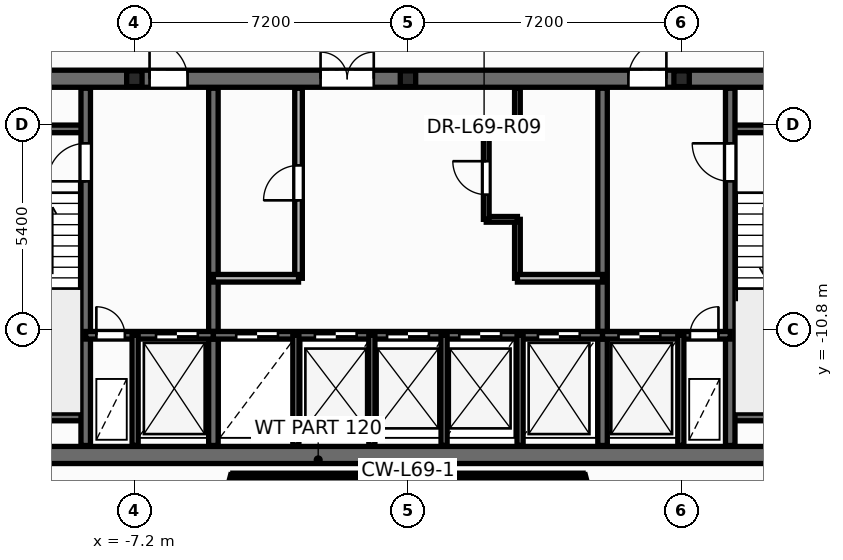
"""IFC4 building model, lengths in metres.
Left out: names, types, materials, properties, quantities, classifications, styles, units other than length and angle.
Written with IfcOpenShell. Run it as: python <this file> out.ifc"""

import sys

from ifc_helpers import new_model, si_unit, direction, frame, frame_2d, origin, origin_2d, place, context, subcontext, project, spatial, rectangle, i_section, extrude, element, fill, save


model = new_model("IFC4")
c1 = context("Model", 3, precision=1e-05, world=origin(), true_north=direction((0.0, 1.0)))
c2 = subcontext(c1, "Body", "Model", "MODEL_VIEW")
j1 = project(units=[si_unit("LENGTHUNIT", "METRE"), si_unit("PLANEANGLEUNIT", "RADIAN")], contexts=[c1])
p1 = place(None, origin())
s1 = spatial("IfcSite", under=j1, at=p1, CompositionType="ELEMENT")
p2 = place(p1, origin())
s2 = spatial("IfcBuilding", under=s1, at=p2, CompositionType="ELEMENT")
p3 = place(p2, frame((0.0, 0.0, 263.4)))
s3 = spatial("IfcBuildingStorey", under=s2, at=p3, CompositionType="ELEMENT", Elevation=263.4)
for number, where, z_axis, x_axis in (
    (1, (-7.2, -4.2, 0.0), (0.0, 0.0, 1.0), (1.0, 0.0, 0.0)),
    (2, (0.0, -4.2, 0.0), (0.0, 0.0, 1.0), (1.0, 0.0, 0.0)),
    (3, (7.2, -4.2, 0.0), (0.0, 0.0, 1.0), (1.0, 0.0, 0.0)),
):
    element("IfcColumn", number, at=place(p3, frame(where, z_axis=z_axis, x_axis=x_axis)), inside=s3, PredefinedType="PILASTER", context=c2, shape_type="SweptSolid", body=[
        extrude(i_section(OverallWidth=0.405, OverallDepth=0.414, WebThickness=0.022, FlangeThickness=0.032, at=origin_2d()), origin(), (0.0, 0.0, 1.0), 3.6),
    ])
p4 = place(p3, frame((2.88, -9.45, 0.0), z_axis=(0.0, 0.0, 1.0), x_axis=(0.0, 1.0, 0.0)))
e4 = element("IfcWall", 4, at=p4, inside=s3, PredefinedType="PARTITIONING", context=c2, shape_type="SweptSolid", body=[
    extrude(rectangle(XDim=1.55, YDim=0.15, at=frame_2d((0.775, 0.0))), origin(), (0.0, 0.0, 1.0), 3.345),
])
p5 = place(p3, frame((2.06, -7.9, 0.0), z_axis=(0.0, 0.0, 1.0), x_axis=(1.0, 0.0, 0.0)))
e5 = element("IfcWall", 5, at=p5, inside=s3, PredefinedType="PARTITIONING", context=c2, shape_type="SweptSolid", body=[
    extrude(rectangle(XDim=0.82, YDim=0.15, at=frame_2d((0.41, 0.0))), origin(), (0.0, 0.0, 1.0), 3.345),
])
p6 = place(p3, frame((2.06, -7.9, 0.0), z_axis=(0.0, 0.0, 1.0), x_axis=(0.0, 1.0, 0.0)))
e6 = element("IfcWall", 6, at=p6, inside=s3, PredefinedType="PARTITIONING", context=c2, shape_type="SweptSolid", body=[
    extrude(rectangle(XDim=2.3, YDim=0.15, at=frame_2d((1.15, 0.0))), origin(), (0.0, 0.0, 1.0), 3.345),
])
p7 = place(p6, frame((0.65, 0.0, 0.0)))
e7 = element("IfcOpeningElement", 7, at=p7, cuts=e6, PredefinedType="OPENING", context=c2, shape_type="SweptSolid", body=[
    extrude(rectangle(XDim=0.886, YDim=2.104, at=frame_2d((0.44, 1.052))), frame((0.0, 0.085, 0.0), z_axis=(0.0, -1.0, 0.0), x_axis=(1.0, 0.0, 0.0)), (0.0, 0.0, 1.0), 0.17),
])
p8 = place(p3, frame((2.06, -5.6, 0.0), z_axis=(0.0, 0.0, 1.0), x_axis=(1.0, 0.0, 0.0)))
e8 = element("IfcWall", 8, at=p8, inside=s3, PredefinedType="PARTITIONING", context=c2, shape_type="SweptSolid", body=[
    extrude(rectangle(XDim=0.82, YDim=0.15, at=frame_2d((0.41, 0.0))), origin(), (0.0, 0.0, 1.0), 3.345),
])
p9 = place(p3, frame((2.88, -5.6, 0.0), z_axis=(0.0, 0.0, 1.0), x_axis=(0.0, 1.0, 0.0)))
e9 = element("IfcWall", 9, at=p9, inside=s3, PredefinedType="PARTITIONING", context=c2, shape_type="SweptSolid", body=[
    extrude(rectangle(XDim=1.15, YDim=0.15, at=frame_2d((0.575, 0.0))), origin(), (0.0, 0.0, 1.0), 3.345),
])
p10 = place(p3, frame((-12.65, -14.1, 0.0), z_axis=(0.0, 0.0, 1.0), x_axis=(1.0, 0.0, 0.0)))
e10 = element("IfcWall", 10, at=p10, inside=s3, PredefinedType="SHEAR", context=c2, shape_type="SweptSolid", body=[
    extrude(rectangle(XDim=25.3, YDim=0.45, at=frame_2d((12.65, 0.0))), origin(), (0.0, 0.0, 1.0), 3.6),
])
p11 = place(p3, frame((-12.65, -4.2, 0.0), z_axis=(0.0, 0.0, 1.0), x_axis=(1.0, 0.0, 0.0)))
e11 = element("IfcWall", 11, at=p11, inside=s3, PredefinedType="SHEAR", context=c2, shape_type="SweptSolid", body=[
    extrude(rectangle(XDim=25.3, YDim=0.45, at=frame_2d((12.65, 0.0))), origin(), (0.0, 0.0, 1.0), 3.6),
])
p12 = place(p11, frame((1.85, 0.0, 0.0)))
e12 = element("IfcOpeningElement", 12, at=p12, cuts=e11, PredefinedType="OPENING", context=c2, shape_type="SweptSolid", body=[
    extrude(rectangle(XDim=0.756, YDim=2.054, at=frame_2d((0.375, 1.027))), frame((0.0, 0.235, 0.0), z_axis=(0.0, -1.0, 0.0), x_axis=(1.0, 0.0, 0.0)), (0.0, 0.0, 1.0), 0.47),
])
p13 = place(p11, frame((22.65, 0.0, 0.0)))
e13 = element("IfcOpeningElement", 13, at=p13, cuts=e11, PredefinedType="OPENING", context=c2, shape_type="SweptSolid", body=[
    extrude(rectangle(XDim=0.756, YDim=2.054, at=frame_2d((0.375, 1.027))), frame((0.0, 0.235, 0.0), z_axis=(0.0, -1.0, 0.0), x_axis=(1.0, 0.0, 0.0)), (0.0, 0.0, 1.0), 0.47),
])
p14 = place(p11, frame((5.85, 0.0, 0.0)))
e14 = element("IfcOpeningElement", 14, at=p14, cuts=e11, PredefinedType="OPENING", context=c2, shape_type="SweptSolid", body=[
    extrude(rectangle(XDim=1.006, YDim=2.104, at=frame_2d((0.5, 1.052))), frame((0.0, 0.235, 0.0), z_axis=(0.0, -1.0, 0.0), x_axis=(1.0, 0.0, 0.0)), (0.0, 0.0, 1.0), 0.47),
])
p15 = place(p11, frame((10.35, 0.0, 0.0)))
e15 = element("IfcOpeningElement", 15, at=p15, cuts=e11, PredefinedType="OPENING", context=c2, shape_type="SweptSolid", body=[
    extrude(rectangle(XDim=1.406, YDim=2.154, at=frame_2d((0.7, 1.077))), frame((0.0, 0.235, 0.0), z_axis=(0.0, -1.0, 0.0), x_axis=(1.0, 0.0, 0.0)), (0.0, 0.0, 1.0), 0.47),
])
p16 = place(p11, frame((18.45, 0.0, 0.0)))
e16 = element("IfcOpeningElement", 16, at=p16, cuts=e11, PredefinedType="OPENING", context=c2, shape_type="SweptSolid", body=[
    extrude(rectangle(XDim=1.006, YDim=2.104, at=frame_2d((0.5, 1.052))), frame((0.0, 0.235, 0.0), z_axis=(0.0, -1.0, 0.0), x_axis=(1.0, 0.0, 0.0)), (0.0, 0.0, 1.0), 0.47),
])
for number, where, z_axis, x_axis in (
    (17, (-12.35, -5.52, 0.0), (0.0, 0.0, 1.0), (1.0, 0.0, 0.0)),
    (18, (-12.35, -13.1, 0.0), (0.0, 0.0, 1.0), (1.0, 0.0, 0.0)),
    (19, (8.48, -5.52, 0.0), (0.0, 0.0, 1.0), (1.0, 0.0, 0.0)),
    (20, (8.48, -13.1, 0.0), (0.0, 0.0, 1.0), (1.0, 0.0, 0.0)),
):
    element("IfcWall", number, at=place(p3, frame(where, z_axis=z_axis, x_axis=x_axis)), inside=s3, PredefinedType="SOLIDWALL", context=c2, shape_type="SweptSolid", body=[
        extrude(rectangle(XDim=3.87, YDim=0.2, at=frame_2d((1.935, 0.0))), origin(), (0.0, 0.0, 1.0), 3.6),
    ])
p17 = place(p3, frame((-8.48, -13.85, 0.0), z_axis=(0.0, 0.0, 1.0), x_axis=(0.0, 1.0, 0.0)))
e21 = element("IfcWall", 21, at=p17, inside=s3, PredefinedType="SHEAR", context=c2, shape_type="SweptSolid", body=[
    extrude(rectangle(XDim=9.4, YDim=0.25, at=frame_2d((4.7, 0.0))), origin(), (0.0, 0.0, 1.0), 3.6),
])
p18 = place(p17, frame((6.95, 0.0, 0.0)))
e22 = element("IfcOpeningElement", 22, at=p18, cuts=e21, PredefinedType="OPENING", context=c2, shape_type="SweptSolid", body=[
    extrude(rectangle(XDim=1.006, YDim=2.104, at=frame_2d((0.5, 1.052))), frame((0.0, 0.135, 0.0), z_axis=(0.0, -1.0, 0.0), x_axis=(1.0, 0.0, 0.0)), (0.0, 0.0, 1.0), 0.27),
])
p19 = place(p3, frame((8.48, -13.85, 0.0), z_axis=(0.0, 0.0, 1.0), x_axis=(0.0, 1.0, 0.0)))
e23 = element("IfcWall", 23, at=p19, inside=s3, PredefinedType="SHEAR", context=c2, shape_type="SweptSolid", body=[
    extrude(rectangle(XDim=9.4, YDim=0.25, at=frame_2d((4.7, 0.0))), origin(), (0.0, 0.0, 1.0), 3.6),
])
p20 = place(p19, frame((6.95, 0.0, 0.0)))
e24 = element("IfcOpeningElement", 24, at=p20, cuts=e23, PredefinedType="OPENING", context=c2, shape_type="SweptSolid", body=[
    extrude(rectangle(XDim=1.006, YDim=2.104, at=frame_2d((0.5, 1.052))), frame((0.0, 0.135, 0.0), z_axis=(0.0, -1.0, 0.0), x_axis=(1.0, 0.0, 0.0)), (0.0, 0.0, 1.0), 0.27),
])
for number, where, z_axis, x_axis in (
    (25, (-5.12, -13.85, 0.0), (0.0, 0.0, 1.0), (0.0, 1.0, 0.0)),
    (26, (5.12, -13.85, 0.0), (0.0, 0.0, 1.0), (0.0, 1.0, 0.0)),
):
    element("IfcWall", number, at=place(p3, frame(where, z_axis=z_axis, x_axis=x_axis)), inside=s3, PredefinedType="SHEAR", context=c2, shape_type="SweptSolid", body=[
        extrude(rectangle(XDim=9.4, YDim=0.25, at=frame_2d((4.7, 0.0))), origin(), (0.0, 0.0, 1.0), 3.6),
    ])
p21 = place(p3, frame((-8.48, -10.95, 0.0), z_axis=(0.0, 0.0, 1.0), x_axis=(1.0, 0.0, 0.0)))
e27 = element("IfcWall", 27, at=p21, inside=s3, PredefinedType="SOLIDWALL", context=c2, shape_type="SweptSolid", body=[
    extrude(rectangle(XDim=3.36, YDim=0.2, at=frame_2d((1.68, 0.0))), origin(), (0.0, 0.0, 1.0), 3.6),
])
p22 = place(p21, frame((0.28, 0.0, 0.0)))
e28 = element("IfcOpeningElement", 28, at=p22, cuts=e27, PredefinedType="OPENING", context=c2, shape_type="SweptSolid", body=[
    extrude(rectangle(XDim=0.756, YDim=2.054, at=frame_2d((0.375, 1.027))), frame((0.0, 0.11, 0.0), z_axis=(0.0, -1.0, 0.0), x_axis=(1.0, 0.0, 0.0)), (0.0, 0.0, 1.0), 0.22),
])
p23 = place(p21, frame((1.85, 0.0, 0.0)))
e29 = element("IfcOpeningElement", 29, at=p23, cuts=e27, PredefinedType="OPENING", context=c2, shape_type="SweptSolid", body=[
    extrude(rectangle(XDim=1.106, YDim=2.104, at=frame_2d((0.55, 1.052))), frame((0.0, 0.11, 0.0), z_axis=(0.0, -1.0, 0.0), x_axis=(1.0, 0.0, 0.0)), (0.0, 0.0, 1.0), 0.22),
])
p24 = place(p3, frame((-5.12, -10.95, 0.0), z_axis=(0.0, 0.0, 1.0), x_axis=(1.0, 0.0, 0.0)))
e30 = element("IfcWall", 30, at=p24, inside=s3, PredefinedType="SOLIDWALL", context=c2, shape_type="SweptSolid", body=[
    extrude(rectangle(XDim=10.24, YDim=0.2, at=frame_2d((5.12, 0.0))), origin(), (0.0, 0.0, 1.0), 3.6),
])
p25 = place(p24, frame((0.6, 0.0, 0.0)))
e31 = element("IfcOpeningElement", 31, at=p25, cuts=e30, PredefinedType="OPENING", context=c2, shape_type="SweptSolid", body=[
    extrude(rectangle(XDim=1.106, YDim=2.104, at=frame_2d((0.55, 1.052))), frame((0.0, 0.11, 0.0), z_axis=(0.0, -1.0, 0.0), x_axis=(1.0, 0.0, 0.0)), (0.0, 0.0, 1.0), 0.22),
])
p26 = place(p24, frame((2.67, 0.0, 0.0)))
e32 = element("IfcOpeningElement", 32, at=p26, cuts=e30, PredefinedType="OPENING", context=c2, shape_type="SweptSolid", body=[
    extrude(rectangle(XDim=1.106, YDim=2.104, at=frame_2d((0.55, 1.052))), frame((0.0, 0.11, 0.0), z_axis=(0.0, -1.0, 0.0), x_axis=(1.0, 0.0, 0.0)), (0.0, 0.0, 1.0), 0.22),
])
p27 = place(p24, frame((4.57, 0.0, 0.0)))
e33 = element("IfcOpeningElement", 33, at=p27, cuts=e30, PredefinedType="OPENING", context=c2, shape_type="SweptSolid", body=[
    extrude(rectangle(XDim=1.106, YDim=2.104, at=frame_2d((0.55, 1.052))), frame((0.0, 0.11, 0.0), z_axis=(0.0, -1.0, 0.0), x_axis=(1.0, 0.0, 0.0)), (0.0, 0.0, 1.0), 0.22),
])
p28 = place(p24, frame((6.47, 0.0, 0.0)))
e34 = element("IfcOpeningElement", 34, at=p28, cuts=e30, PredefinedType="OPENING", context=c2, shape_type="SweptSolid", body=[
    extrude(rectangle(XDim=1.106, YDim=2.104, at=frame_2d((0.55, 1.052))), frame((0.0, 0.11, 0.0), z_axis=(0.0, -1.0, 0.0), x_axis=(1.0, 0.0, 0.0)), (0.0, 0.0, 1.0), 0.22),
])
p29 = place(p24, frame((8.54, 0.0, 0.0)))
e35 = element("IfcOpeningElement", 35, at=p29, cuts=e30, PredefinedType="OPENING", context=c2, shape_type="SweptSolid", body=[
    extrude(rectangle(XDim=1.106, YDim=2.104, at=frame_2d((0.55, 1.052))), frame((0.0, 0.11, 0.0), z_axis=(0.0, -1.0, 0.0), x_axis=(1.0, 0.0, 0.0)), (0.0, 0.0, 1.0), 0.22),
])
p30 = place(p3, frame((5.12, -10.95, 0.0), z_axis=(0.0, 0.0, 1.0), x_axis=(1.0, 0.0, 0.0)))
e36 = element("IfcWall", 36, at=p30, inside=s3, PredefinedType="SOLIDWALL", context=c2, shape_type="SweptSolid", body=[
    extrude(rectangle(XDim=3.36, YDim=0.2, at=frame_2d((1.68, 0.0))), origin(), (0.0, 0.0, 1.0), 3.6),
])
p31 = place(p30, frame((0.42, 0.0, 0.0)))
e37 = element("IfcOpeningElement", 37, at=p31, cuts=e36, PredefinedType="OPENING", context=c2, shape_type="SweptSolid", body=[
    extrude(rectangle(XDim=1.106, YDim=2.104, at=frame_2d((0.55, 1.052))), frame((0.0, 0.11, 0.0), z_axis=(0.0, -1.0, 0.0), x_axis=(1.0, 0.0, 0.0)), (0.0, 0.0, 1.0), 0.22),
])
p32 = place(p30, frame((2.3, 0.0, 0.0)))
e38 = element("IfcOpeningElement", 38, at=p32, cuts=e36, PredefinedType="OPENING", context=c2, shape_type="SweptSolid", body=[
    extrude(rectangle(XDim=0.756, YDim=2.054, at=frame_2d((0.375, 1.027))), frame((0.0, 0.11, 0.0), z_axis=(0.0, -1.0, 0.0), x_axis=(1.0, 0.0, 0.0)), (0.0, 0.0, 1.0), 0.22),
])
for number, where, z_axis, x_axis in (
    (39, (-7.18, -13.85, 0.0), (0.0, 0.0, 1.0), (0.0, 1.0, 0.0)),
    (40, (7.18, -13.85, 0.0), (0.0, 0.0, 1.0), (0.0, 1.0, 0.0)),
    (41, (-2.95, -13.85, 0.0), (0.0, 0.0, 1.0), (0.0, 1.0, 0.0)),
    (42, (2.95, -13.85, 0.0), (0.0, 0.0, 1.0), (0.0, 1.0, 0.0)),
):
    element("IfcWall", number, at=place(p3, frame(where, z_axis=z_axis, x_axis=x_axis)), inside=s3, PredefinedType="PARTITIONING", context=c2, shape_type="SweptSolid", body=[
        extrude(rectangle(XDim=2.9, YDim=0.16, at=frame_2d((1.45, 0.0))), origin(), (0.0, 0.0, 1.0), 2.57),
    ])
p33 = place(p3, frame((-2.88, -9.45, 0.0), z_axis=(0.0, 0.0, 1.0), x_axis=(0.0, 1.0, 0.0)))
e43 = element("IfcWall", 43, at=p33, inside=s3, PredefinedType="SOLIDWALL", context=c2, shape_type="SweptSolid", body=[
    extrude(rectangle(XDim=5.0, YDim=0.2, at=frame_2d((2.5, 0.0))), origin(), (0.0, 0.0, 1.0), 3.345),
])
p34 = place(p33, frame((2.05, 0.0, 0.0)))
e44 = element("IfcOpeningElement", 44, at=p34, cuts=e43, PredefinedType="OPENING", context=c2, shape_type="SweptSolid", body=[
    extrude(rectangle(XDim=0.926, YDim=2.104, at=frame_2d((0.46, 1.052))), frame((0.0, 0.11, 0.0), z_axis=(0.0, -1.0, 0.0), x_axis=(1.0, 0.0, 0.0)), (0.0, 0.0, 1.0), 0.22),
])
for number, where, z_axis, x_axis in (
    (45, (-5.12, -9.45, 0.0), (0.0, 0.0, 1.0), (1.0, 0.0, 0.0)),
    (46, (2.88, -9.45, 0.0), (0.0, 0.0, 1.0), (1.0, 0.0, 0.0)),
):
    element("IfcWall", number, at=place(p3, frame(where, z_axis=z_axis, x_axis=x_axis)), inside=s3, PredefinedType="SOLIDWALL", context=c2, shape_type="SweptSolid", body=[
        extrude(rectangle(XDim=2.24, YDim=0.2, at=frame_2d((1.12, 0.0))), origin(), (0.0, 0.0, 1.0), 3.345),
    ])
for number, where, z_axis, x_axis in (
    (47, (-0.95, -13.85, 0.0), (0.0, 0.0, 1.0), (0.0, 1.0, 0.0)),
    (48, (0.95, -13.85, 0.0), (0.0, 0.0, 1.0), (0.0, 1.0, 0.0)),
):
    element("IfcWall", number, at=place(p3, frame(where, z_axis=z_axis, x_axis=x_axis)), inside=s3, PredefinedType="PARTITIONING", context=c2, shape_type="SweptSolid", body=[
        extrude(rectangle(XDim=2.9, YDim=0.16, at=frame_2d((1.45, 0.0))), origin(), (0.0, 0.0, 1.0), 2.57),
    ])
for number, where, z_axis, x_axis in (
    (49, (-4.609, -14.639, 0.0), (0.0, 0.0, 1.0), (1.0, 0.0, 0.0)),
    (50, (0.116, -14.639, 0.0), (0.0, 0.0, 1.0), (1.0, 0.0, 0.0)),
):
    element("IfcWall", number, at=place(p3, frame(where, z_axis=z_axis, x_axis=x_axis)), inside=s3, PredefinedType="PARTITIONING", context=c2, shape_type="SweptSolid", body=[
        extrude(rectangle(XDim=4.493, YDim=0.12, at=frame_2d((2.247, 0.0))), origin(), (0.0, 0.0, 1.0), 3.345),
    ])
for number, where, z_axis, x_axis in (
    (51, (-4.783, -15.309, 0.0), (0.0, 0.0, 1.0), (0.252, 0.968, 0.0)),
    (52, (4.609, -14.639, 0.0), (0.0, 0.0, 1.0), (0.252, -0.968, 0.0)),
):
    element("IfcWall", number, at=place(p3, frame(where, z_axis=z_axis, x_axis=x_axis)), inside=s3, PredefinedType="PARTITIONING", context=c2, shape_type="SweptSolid", body=[
        extrude(rectangle(XDim=0.692, YDim=0.12, at=frame_2d((0.346, 0.0))), origin(), (0.0, 0.0, 1.0), 2.863),
    ])
for number, where, z_axis, x_axis in (
    (53, (-0.116, -14.639, 0.0), (0.0, 0.0, 1.0), (0.0, -1.0, 0.0)),
    (54, (0.116, -15.309, 0.0), (0.0, 0.0, 1.0), (0.0, 1.0, 0.0)),
):
    element("IfcWall", number, at=place(p3, frame(where, z_axis=z_axis, x_axis=x_axis)), inside=s3, PredefinedType="PARTITIONING", context=c2, shape_type="SweptSolid", body=[
        extrude(rectangle(XDim=0.67, YDim=0.12, at=frame_2d((0.335, 0.0))), origin(), (0.0, 0.0, 1.0), 2.863),
    ])
p35 = place(p34, origin())
e55 = element("IfcDoor", 55, at=p35, inside=s3, OperationType="SINGLE_SWING_LEFT", PredefinedType="DOOR", context=c2, shape_type="SweptSolid", body=[
    extrude(rectangle(XDim=0.92, YDim=2.1, at=frame_2d((0.46, 1.05))), frame((0.0, 0.025, 0.0), z_axis=(0.0, -1.0, 0.0), x_axis=(1.0, 0.0, 0.0)), (0.0, 0.0, 1.0), 0.05),
])
fill(e44, e55)
p36 = place(p7, origin())
e56 = element("IfcDoor", 56, at=p36, inside=s3, OperationType="SINGLE_SWING_RIGHT", PredefinedType="DOOR", context=c2, shape_type="SweptSolid", body=[
    extrude(rectangle(XDim=0.88, YDim=2.1, at=frame_2d((0.44, 1.05))), frame((0.0, 0.025, 0.0), z_axis=(0.0, -1.0, 0.0), x_axis=(1.0, 0.0, 0.0)), (0.0, 0.0, 1.0), 0.05),
])
fill(e7, e56)
p37 = place(p18, origin())
e57 = element("IfcDoor", 57, at=p37, inside=s3, OperationType="SINGLE_SWING_LEFT", PredefinedType="DOOR", context=c2, shape_type="SweptSolid", body=[
    extrude(rectangle(XDim=1.0, YDim=2.1, at=frame_2d((0.5, 1.05))), frame((0.0, 0.025, 0.0), z_axis=(0.0, -1.0, 0.0), x_axis=(1.0, 0.0, 0.0)), (0.0, 0.0, 1.0), 0.05),
])
fill(e22, e57)
p38 = place(p20, origin())
e58 = element("IfcDoor", 58, at=p38, inside=s3, OperationType="SINGLE_SWING_RIGHT", PredefinedType="DOOR", context=c2, shape_type="SweptSolid", body=[
    extrude(rectangle(XDim=1.0, YDim=2.1, at=frame_2d((0.5, 1.05))), frame((0.0, 0.025, 0.0), z_axis=(0.0, -1.0, 0.0), x_axis=(1.0, 0.0, 0.0)), (0.0, 0.0, 1.0), 0.05),
])
fill(e24, e58)
p39 = place(p22, origin())
e59 = element("IfcDoor", 59, at=p39, inside=s3, OperationType="SINGLE_SWING_LEFT", PredefinedType="DOOR", context=c2, shape_type="SweptSolid", body=[
    extrude(rectangle(XDim=0.75, YDim=2.05, at=frame_2d((0.375, 1.025))), frame((0.0, 0.025, 0.0), z_axis=(0.0, -1.0, 0.0), x_axis=(1.0, 0.0, 0.0)), (0.0, 0.0, 1.0), 0.05),
])
fill(e28, e59)
p40 = place(p23, origin())
e60 = element("IfcDoor", 60, at=p40, inside=s3, OperationType="DOUBLE_DOOR_SLIDING", PredefinedType="DOOR", context=c2, shape_type="SweptSolid", body=[
    extrude(rectangle(XDim=1.1, YDim=2.1, at=frame_2d((0.55, 1.05))), frame((0.0, 0.025, 0.0), z_axis=(0.0, -1.0, 0.0), x_axis=(1.0, 0.0, 0.0)), (0.0, 0.0, 1.0), 0.05),
])
fill(e29, e60)
p41 = place(p31, origin())
e61 = element("IfcDoor", 61, at=p41, inside=s3, OperationType="DOUBLE_DOOR_SLIDING", PredefinedType="DOOR", context=c2, shape_type="SweptSolid", body=[
    extrude(rectangle(XDim=1.1, YDim=2.1, at=frame_2d((0.55, 1.05))), frame((0.0, 0.025, 0.0), z_axis=(0.0, -1.0, 0.0), x_axis=(1.0, 0.0, 0.0)), (0.0, 0.0, 1.0), 0.05),
])
fill(e37, e61)
p42 = place(p32, origin())
e62 = element("IfcDoor", 62, at=p42, inside=s3, OperationType="SINGLE_SWING_RIGHT", PredefinedType="DOOR", context=c2, shape_type="SweptSolid", body=[
    extrude(rectangle(XDim=0.75, YDim=2.05, at=frame_2d((0.375, 1.025))), frame((0.0, 0.025, 0.0), z_axis=(0.0, -1.0, 0.0), x_axis=(1.0, 0.0, 0.0)), (0.0, 0.0, 1.0), 0.05),
])
fill(e38, e62)
p43 = place(p25, origin())
e63 = element("IfcDoor", 63, at=p43, inside=s3, OperationType="DOUBLE_DOOR_SLIDING", PredefinedType="DOOR", context=c2, shape_type="SweptSolid", body=[
    extrude(rectangle(XDim=1.1, YDim=2.1, at=frame_2d((0.55, 1.05))), frame((0.0, 0.025, 0.0), z_axis=(0.0, -1.0, 0.0), x_axis=(1.0, 0.0, 0.0)), (0.0, 0.0, 1.0), 0.05),
])
fill(e31, e63)
p44 = place(p26, origin())
e64 = element("IfcDoor", 64, at=p44, inside=s3, OperationType="DOUBLE_DOOR_SLIDING", PredefinedType="DOOR", context=c2, shape_type="SweptSolid", body=[
    extrude(rectangle(XDim=1.1, YDim=2.1, at=frame_2d((0.55, 1.05))), frame((0.0, 0.025, 0.0), z_axis=(0.0, -1.0, 0.0), x_axis=(1.0, 0.0, 0.0)), (0.0, 0.0, 1.0), 0.05),
])
fill(e32, e64)
p45 = place(p27, origin())
e65 = element("IfcDoor", 65, at=p45, inside=s3, OperationType="DOUBLE_DOOR_SLIDING", PredefinedType="DOOR", context=c2, shape_type="SweptSolid", body=[
    extrude(rectangle(XDim=1.1, YDim=2.1, at=frame_2d((0.55, 1.05))), frame((0.0, 0.025, 0.0), z_axis=(0.0, -1.0, 0.0), x_axis=(1.0, 0.0, 0.0)), (0.0, 0.0, 1.0), 0.05),
])
fill(e33, e65)
p46 = place(p28, origin())
e66 = element("IfcDoor", 66, at=p46, inside=s3, OperationType="DOUBLE_DOOR_SLIDING", PredefinedType="DOOR", context=c2, shape_type="SweptSolid", body=[
    extrude(rectangle(XDim=1.1, YDim=2.1, at=frame_2d((0.55, 1.05))), frame((0.0, 0.025, 0.0), z_axis=(0.0, -1.0, 0.0), x_axis=(1.0, 0.0, 0.0)), (0.0, 0.0, 1.0), 0.05),
])
fill(e34, e66)
p47 = place(p29, origin())
e67 = element("IfcDoor", 67, at=p47, inside=s3, OperationType="DOUBLE_DOOR_SLIDING", PredefinedType="DOOR", context=c2, shape_type="SweptSolid", body=[
    extrude(rectangle(XDim=1.1, YDim=2.1, at=frame_2d((0.55, 1.05))), frame((0.0, 0.025, 0.0), z_axis=(0.0, -1.0, 0.0), x_axis=(1.0, 0.0, 0.0)), (0.0, 0.0, 1.0), 0.05),
])
fill(e35, e67)
p48 = place(p14, origin())
e68 = element("IfcDoor", 68, at=p48, inside=s3, OperationType="SINGLE_SWING_LEFT", PredefinedType="DOOR", context=c2, shape_type="SweptSolid", body=[
    extrude(rectangle(XDim=1.0, YDim=2.1, at=frame_2d((0.5, 1.05))), frame((0.0, 0.025, 0.0), z_axis=(0.0, -1.0, 0.0), x_axis=(1.0, 0.0, 0.0)), (0.0, 0.0, 1.0), 0.05),
])
fill(e14, e68)
p49 = place(p15, origin())
e69 = element("IfcDoor", 69, at=p49, inside=s3, OperationType="DOUBLE_DOOR_SINGLE_SWING", PredefinedType="DOOR", context=c2, shape_type="SweptSolid", body=[
    extrude(rectangle(XDim=1.4, YDim=2.15, at=frame_2d((0.7, 1.075))), frame((0.0, 0.025, 0.0), z_axis=(0.0, -1.0, 0.0), x_axis=(1.0, 0.0, 0.0)), (0.0, 0.0, 1.0), 0.05),
])
fill(e15, e69)
p50 = place(p16, origin())
e70 = element("IfcDoor", 70, at=p50, inside=s3, OperationType="SINGLE_SWING_RIGHT", PredefinedType="DOOR", context=c2, shape_type="SweptSolid", body=[
    extrude(rectangle(XDim=1.0, YDim=2.1, at=frame_2d((0.5, 1.05))), frame((0.0, 0.025, 0.0), z_axis=(0.0, -1.0, 0.0), x_axis=(1.0, 0.0, 0.0)), (0.0, 0.0, 1.0), 0.05),
])
fill(e16, e70)
save(model, sys.argv[1])
